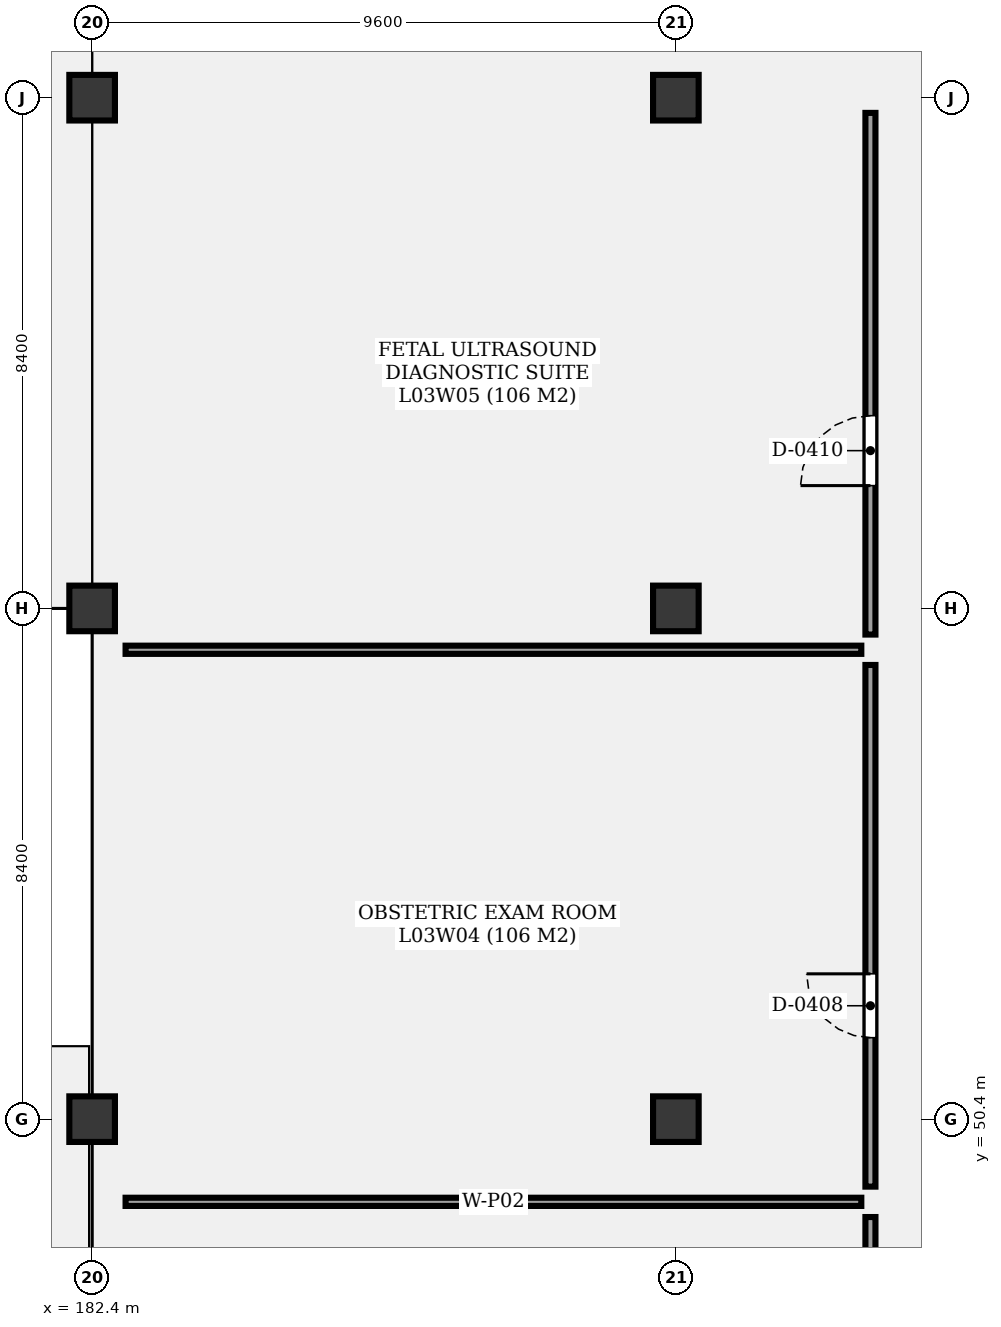
"""IFC4 building model, lengths in metres.
Left out: names, types, materials, properties, quantities, classifications, styles, units other than length and angle.
Written with IfcOpenShell. Run it as: python <this file> out.ifc"""

import sys

from ifc_helpers import new_model, si_unit, direction, frame, frame_2d, origin, origin_2d, place, context, subcontext, project, spatial, rectangle, extrude, element, fill, save


model = new_model("IFC4")
c1 = context("Model", 3, precision=1e-05, world=origin(), true_north=direction((0.0, 1.0)))
c2 = subcontext(c1, "Body", "Model", "MODEL_VIEW")
j1 = project(units=[si_unit("LENGTHUNIT", "METRE"), si_unit("PLANEANGLEUNIT", "RADIAN")], contexts=[c1])
p1 = place(None, origin())
s1 = spatial("IfcSite", under=j1, at=p1, CompositionType="ELEMENT")
p2 = place(p1, origin())
s2 = spatial("IfcBuilding", under=s1, at=p2, CompositionType="ELEMENT")
p3 = place(p2, frame((0.0, 0.0, 13.5)))
s3 = spatial("IfcBuildingStorey", under=s2, at=p3, CompositionType="ELEMENT", Elevation=13.5)
for number, where, z_axis, x_axis in (
    (1, (182.4, 50.4, 0.0), (0.0, 0.0, 1.0), (1.0, 0.0, 0.0)),
    (2, (182.4, 58.8, 0.0), (0.0, 0.0, 1.0), (1.0, 0.0, 0.0)),
    (3, (182.4, 67.2, 0.0), (0.0, 0.0, 1.0), (1.0, 0.0, 0.0)),
    (4, (192.0, 50.4, 0.0), (0.0, 0.0, 1.0), (1.0, 0.0, 0.0)),
    (5, (192.0, 58.8, 0.0), (0.0, 0.0, 1.0), (1.0, 0.0, 0.0)),
    (6, (192.0, 67.2, 0.0), (0.0, 0.0, 1.0), (1.0, 0.0, 0.0)),
):
    element("IfcColumn", number, at=place(p3, frame(where, z_axis=z_axis, x_axis=x_axis)), inside=s3, PredefinedType="COLUMN", context=c2, shape_type="SweptSolid", body=[
        extrude(rectangle(XDim=0.75, YDim=0.75, at=origin_2d()), origin(), (0.0, 0.0, 1.0), 4.3),
    ])
p4 = place(p3, frame((195.2, 40.21, 0.0), z_axis=(0.0, 0.0, 1.0), x_axis=(0.0, 1.0, 0.0)))
e7 = element("IfcWall", 7, at=p4, inside=s3, PredefinedType="PARTITIONING", context=c2, shape_type="SweptSolid", body=[
    extrude(rectangle(XDim=8.58, YDim=0.165, at=frame_2d((4.29, 0.0))), origin(), (0.0, 0.0, 1.0), 3.4),
])
p5 = place(p4, frame((2.45, 0.0, 0.0)))
e8 = element("IfcOpeningElement", 8, at=p5, cuts=e7, PredefinedType="OPENING", context=c2, shape_type="SweptSolid", body=[
    extrude(rectangle(XDim=1.15, YDim=2.2, at=frame_2d((0.575, 1.1))), frame((0.0, 0.093, 0.0), z_axis=(0.0, -1.0, 0.0), x_axis=(1.0, 0.0, 0.0)), (0.0, 0.0, 1.0), 0.185),
])
p6 = place(p3, frame((195.2, 49.29, 0.0), z_axis=(0.0, 0.0, 1.0), x_axis=(0.0, 1.0, 0.0)))
e9 = element("IfcWall", 9, at=p6, inside=s3, PredefinedType="PARTITIONING", context=c2, shape_type="SweptSolid", body=[
    extrude(rectangle(XDim=8.58, YDim=0.165, at=frame_2d((4.29, 0.0))), origin(), (0.0, 0.0, 1.0), 3.4),
])
p7 = place(p6, frame((2.45, 0.0, 0.0)))
e10 = element("IfcOpeningElement", 10, at=p7, cuts=e9, PredefinedType="OPENING", context=c2, shape_type="SweptSolid", body=[
    extrude(rectangle(XDim=1.05, YDim=2.1, at=frame_2d((0.525, 1.05))), frame((0.0, 0.093, 0.0), z_axis=(0.0, -1.0, 0.0), x_axis=(1.0, 0.0, 0.0)), (0.0, 0.0, 1.0), 0.185),
])
p8 = place(p3, frame((182.95, 49.04, 0.0), z_axis=(0.0, 0.0, 1.0), x_axis=(1.0, 0.0, 0.0)))
e11 = element("IfcWall", 11, at=p8, inside=s3, PredefinedType="PARTITIONING", context=c2, shape_type="SweptSolid", body=[
    extrude(rectangle(XDim=12.1, YDim=0.135, at=frame_2d((6.05, 0.0))), origin(), (0.0, 0.0, 1.0), 3.4),
])
p9 = place(p3, frame((195.2, 58.37, 0.0), z_axis=(0.0, 0.0, 1.0), x_axis=(0.0, 1.0, 0.0)))
e12 = element("IfcWall", 12, at=p9, inside=s3, PredefinedType="PARTITIONING", context=c2, shape_type="SweptSolid", body=[
    extrude(rectangle(XDim=8.58, YDim=0.165, at=frame_2d((4.29, 0.0))), origin(), (0.0, 0.0, 1.0), 3.4),
])
p10 = place(p9, frame((2.45, 0.0, 0.0)))
e13 = element("IfcOpeningElement", 13, at=p10, cuts=e12, PredefinedType="OPENING", context=c2, shape_type="SweptSolid", body=[
    extrude(rectangle(XDim=1.15, YDim=2.2, at=frame_2d((0.575, 1.1))), frame((0.0, 0.093, 0.0), z_axis=(0.0, -1.0, 0.0), x_axis=(1.0, 0.0, 0.0)), (0.0, 0.0, 1.0), 0.185),
])
p11 = place(p3, frame((182.95, 58.12, 0.0), z_axis=(0.0, 0.0, 1.0), x_axis=(1.0, 0.0, 0.0)))
e14 = element("IfcWall", 14, at=p11, inside=s3, PredefinedType="PARTITIONING", context=c2, shape_type="SweptSolid", body=[
    extrude(rectangle(XDim=12.1, YDim=0.135, at=frame_2d((6.05, 0.0))), origin(), (0.0, 0.0, 1.0), 3.4),
])
p12 = place(p7, origin())
e15 = element("IfcDoor", 15, at=p12, inside=s3, OperationType="SINGLE_SWING_RIGHT", PredefinedType="DOOR", context=c2, shape_type="SweptSolid", body=[
    extrude(rectangle(XDim=1.05, YDim=2.1, at=frame_2d((0.525, 1.05))), frame((0.0, 0.025, 0.0), z_axis=(0.0, -1.0, 0.0), x_axis=(1.0, 0.0, 0.0)), (0.0, 0.0, 1.0), 0.05),
])
fill(e10, e15)
p13 = place(p10, origin())
e16 = element("IfcDoor", 16, at=p13, inside=s3, OperationType="SINGLE_SWING_LEFT", PredefinedType="DOOR", context=c2, shape_type="SweptSolid", body=[
    extrude(rectangle(XDim=1.15, YDim=2.2, at=frame_2d((0.575, 1.1))), frame((0.0, 0.025, 0.0), z_axis=(0.0, -1.0, 0.0), x_axis=(1.0, 0.0, 0.0)), (0.0, 0.0, 1.0), 0.05),
])
fill(e13, e16)
save(model, sys.argv[1])
